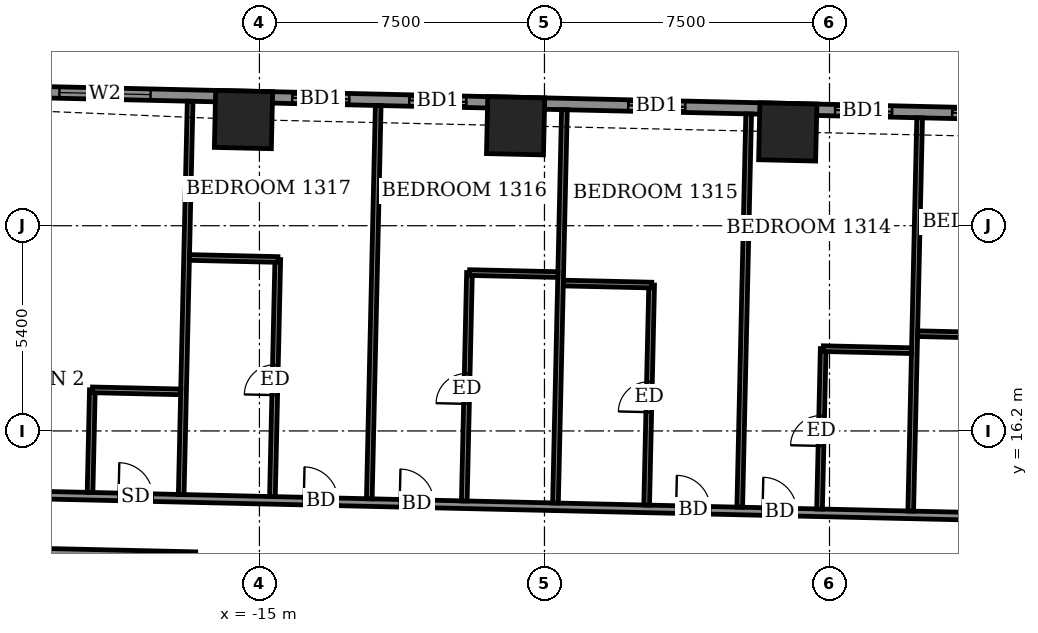
"""IFC4 building model, lengths in metres.
Left out: names, types, materials, properties, quantities, classifications, styles, units other than length and angle.
Written with IfcOpenShell. Run it as: python <this file> out.ifc"""

import sys

from ifc_helpers import new_model, si_unit, direction, frame, frame_2d, origin, origin_2d, place, context, subcontext, project, spatial, rectangle, extrude, element, fill, save


model = new_model("IFC4")
c1 = context("Model", 3, precision=1e-05, world=origin(), true_north=direction((0.0, 1.0)))
c2 = subcontext(c1, "Body", "Model", "MODEL_VIEW")
j1 = project(units=[si_unit("LENGTHUNIT", "METRE"), si_unit("PLANEANGLEUNIT", "RADIAN")], contexts=[c1])
p1 = place(None, origin())
s1 = spatial("IfcSite", under=j1, at=p1, CompositionType="ELEMENT")
p2 = place(p1, origin())
s2 = spatial("IfcBuilding", under=s1, at=p2, CompositionType="ELEMENT")
p3 = place(p2, frame((0.0, 0.0, 56.7)))
s3 = spatial("IfcBuildingStorey", under=s2, at=p3, CompositionType="ELEMENT", Elevation=56.7)
for number, where, z_axis, x_axis in (
    (1, (-1.098, 24.068, -0.55), (0.0, 0.0, 1.0), (-1.0, 0.023, 0.0)),
    (2, (-8.259, 24.23, -0.55), (0.0, 0.0, 1.0), (-1.0, 0.023, 0.0)),
    (3, (-15.419, 24.393, -0.55), (0.0, 0.0, 1.0), (-1.0, 0.023, 0.0)),
):
    element("IfcColumn", number, at=place(p3, frame(where, z_axis=z_axis, x_axis=x_axis)), inside=s3, PredefinedType="COLUMN", context=c2, shape_type="SweptSolid", body=[
        extrude(rectangle(XDim=1.5, YDim=1.5, at=origin_2d()), origin(), (0.0, 0.0, 1.0), 3.6),
    ])
p4 = place(p3, frame((27.407, 24.021, 0.0), z_axis=(0.0, 0.0, 1.0), x_axis=(-0.99974239923, 0.022696589664, 0.0)))
e4 = element("IfcWall", 4, at=p4, inside=s3, PredefinedType="SOLIDWALL", context=c2, shape_type="SweptSolid", body=[
    extrude(rectangle(XDim=49.836, YDim=0.3, at=frame_2d((24.918, 0.0))), origin(), (0.0, 0.0, 1.0), 3.05),
])
p5 = place(p4, frame((2.871, 0.0, 0.0)))
e5 = element("IfcOpeningElement", 5, at=p5, cuts=e4, PredefinedType="OPENING", context=c2, shape_type="SweptSolid", body=[
    extrude(rectangle(XDim=1.5, YDim=2.4, at=frame_2d((0.75, 1.2))), frame((0.0, 0.16, 0.0), z_axis=(0.0, -1.0, 0.0), x_axis=(1.0, 0.0, 0.0)), (0.0, 0.0, 1.0), 0.32),
])
p6 = place(p4, frame((8.349, 0.0, 0.0)))
e6 = element("IfcOpeningElement", 6, at=p6, cuts=e4, PredefinedType="OPENING", context=c2, shape_type="SweptSolid", body=[
    extrude(rectangle(XDim=1.5, YDim=2.4, at=frame_2d((0.75, 1.2))), frame((0.0, 0.16, 0.0), z_axis=(0.0, -1.0, 0.0), x_axis=(1.0, 0.0, 0.0)), (0.0, 0.0, 1.0), 0.32),
])
p7 = place(p4, frame((11.43, 0.0, 0.0)))
e7 = element("IfcOpeningElement", 7, at=p7, cuts=e4, PredefinedType="OPENING", context=c2, shape_type="SweptSolid", body=[
    extrude(rectangle(XDim=1.5, YDim=2.4, at=frame_2d((0.75, 1.2))), frame((0.0, 0.16, 0.0), z_axis=(0.0, -1.0, 0.0), x_axis=(1.0, 0.0, 0.0)), (0.0, 0.0, 1.0), 0.32),
])
p8 = place(p4, frame((17.236, 0.0, 0.0)))
e8 = element("IfcOpeningElement", 8, at=p8, cuts=e4, PredefinedType="OPENING", context=c2, shape_type="SweptSolid", body=[
    extrude(rectangle(XDim=1.5, YDim=2.4, at=frame_2d((0.75, 1.2))), frame((0.0, 0.16, 0.0), z_axis=(0.0, -1.0, 0.0), x_axis=(1.0, 0.0, 0.0)), (0.0, 0.0, 1.0), 0.32),
])
p9 = place(p4, frame((22.686, 0.0, 0.0)))
e9 = element("IfcOpeningElement", 9, at=p9, cuts=e4, PredefinedType="OPENING", context=c2, shape_type="SweptSolid", body=[
    extrude(rectangle(XDim=1.5, YDim=2.4, at=frame_2d((0.75, 1.2))), frame((0.0, 0.16, 0.0), z_axis=(0.0, -1.0, 0.0), x_axis=(1.0, 0.0, 0.0)), (0.0, 0.0, 1.0), 0.32),
])
p10 = place(p4, frame((25.767, 0.0, 0.0)))
e10 = element("IfcOpeningElement", 10, at=p10, cuts=e4, PredefinedType="OPENING", context=c2, shape_type="SweptSolid", body=[
    extrude(rectangle(XDim=1.5, YDim=2.4, at=frame_2d((0.75, 1.2))), frame((0.0, 0.16, 0.0), z_axis=(0.0, -1.0, 0.0), x_axis=(1.0, 0.0, 0.0)), (0.0, 0.0, 1.0), 0.32),
])
p11 = place(p4, frame((31.211, 0.0, 0.0)))
e11 = element("IfcOpeningElement", 11, at=p11, cuts=e4, PredefinedType="OPENING", context=c2, shape_type="SweptSolid", body=[
    extrude(rectangle(XDim=1.5, YDim=2.4, at=frame_2d((0.75, 1.2))), frame((0.0, 0.16, 0.0), z_axis=(0.0, -1.0, 0.0), x_axis=(1.0, 0.0, 0.0)), (0.0, 0.0, 1.0), 0.32),
])
p12 = place(p4, frame((36.974, 0.0, 0.0)))
e12 = element("IfcOpeningElement", 12, at=p12, cuts=e4, PredefinedType="OPENING", context=c2, shape_type="SweptSolid", body=[
    extrude(rectangle(XDim=1.5, YDim=2.4, at=frame_2d((0.75, 1.2))), frame((0.0, 0.16, 0.0), z_axis=(0.0, -1.0, 0.0), x_axis=(1.0, 0.0, 0.0)), (0.0, 0.0, 1.0), 0.32),
])
p13 = place(p4, frame((40.055, 0.0, 0.0)))
e13 = element("IfcOpeningElement", 13, at=p13, cuts=e4, PredefinedType="OPENING", context=c2, shape_type="SweptSolid", body=[
    extrude(rectangle(XDim=1.5, YDim=2.4, at=frame_2d((0.75, 1.2))), frame((0.0, 0.16, 0.0), z_axis=(0.0, -1.0, 0.0), x_axis=(1.0, 0.0, 0.0)), (0.0, 0.0, 1.0), 0.32),
])
p14 = place(p4, frame((45.282, 0.0, 0.9)))
e14 = element("IfcOpeningElement", 14, at=p14, cuts=e4, PredefinedType="OPENING", context=c2, shape_type="SweptSolid", body=[
    extrude(rectangle(XDim=2.4, YDim=1.5, at=frame_2d((1.2, 0.75))), frame((0.0, 0.16, 0.0), z_axis=(0.0, -1.0, 0.0), x_axis=(1.0, 0.0, 0.0)), (0.0, 0.0, 1.0), 0.32),
])
p15 = place(p3, frame((-25.49, 13.118, 0.0), z_axis=(0.0, 0.0, 1.0), x_axis=(0.999742607231, -0.02268742575, 0.0)))
e15 = element("IfcWall", 15, at=p15, inside=s3, PredefinedType="PARTITIONING", context=c2, shape_type="SweptSolid", body=[
    extrude(rectangle(XDim=8.813, YDim=0.2, at=frame_2d((4.407, 0.0))), origin(), (0.0, 0.0, 1.0), 3.05),
])
p16 = place(p15, frame((2.832, 0.0, 0.0)))
e16 = element("IfcOpeningElement", 16, at=p16, cuts=e15, PredefinedType="OPENING", context=c2, shape_type="SweptSolid", body=[
    extrude(rectangle(XDim=1.0, YDim=2.1, at=frame_2d((0.5, 1.05))), frame((0.0, 0.11, 0.0), z_axis=(0.0, -1.0, 0.0), x_axis=(1.0, 0.0, 0.0)), (0.0, 0.0, 1.0), 0.22),
])
p17 = place(p3, frame((-25.456, 14.618, 0.0), z_axis=(0.0, 0.0, 1.0), x_axis=(0.999742687583, -0.0226838847, 0.0)))
e17 = element("IfcWall", 17, at=p17, inside=s3, PredefinedType="PARTITIONING", context=c2, shape_type="SweptSolid", body=[
    extrude(rectangle(XDim=54.836, YDim=0.2, at=frame_2d((27.418, 0.0))), origin(), (0.0, 0.0, 1.0), 3.05),
])
p18 = place(p17, frame((52.493, 0.0, 0.0)))
e18 = element("IfcOpeningElement", 18, at=p18, cuts=e17, PredefinedType="OPENING", context=c2, shape_type="SweptSolid", body=[
    extrude(rectangle(XDim=1.0, YDim=2.1, at=frame_2d((0.5, 1.05))), frame((0.0, 0.11, 0.0), z_axis=(0.0, -1.0, 0.0), x_axis=(1.0, 0.0, 0.0)), (0.0, 0.0, 1.0), 0.22),
])
p19 = place(p17, frame((47.25, 0.0, 0.0)))
e19 = element("IfcOpeningElement", 19, at=p19, cuts=e17, PredefinedType="OPENING", context=c2, shape_type="SweptSolid", body=[
    extrude(rectangle(XDim=0.9, YDim=2.1, at=frame_2d((0.45, 1.05))), frame((0.0, 0.11, 0.0), z_axis=(0.0, -1.0, 0.0), x_axis=(1.0, 0.0, 0.0)), (0.0, 0.0, 1.0), 0.22),
])
p20 = place(p17, frame((42.525, 0.0, 0.0)))
e20 = element("IfcOpeningElement", 20, at=p20, cuts=e17, PredefinedType="OPENING", context=c2, shape_type="SweptSolid", body=[
    extrude(rectangle(XDim=0.9, YDim=2.1, at=frame_2d((0.45, 1.05))), frame((0.0, 0.11, 0.0), z_axis=(0.0, -1.0, 0.0), x_axis=(1.0, 0.0, 0.0)), (0.0, 0.0, 1.0), 0.22),
])
p21 = place(p17, frame((40.275, 0.0, 0.0)))
e21 = element("IfcOpeningElement", 21, at=p21, cuts=e17, PredefinedType="OPENING", context=c2, shape_type="SweptSolid", body=[
    extrude(rectangle(XDim=0.9, YDim=2.1, at=frame_2d((0.45, 1.05))), frame((0.0, 0.11, 0.0), z_axis=(0.0, -1.0, 0.0), x_axis=(1.0, 0.0, 0.0)), (0.0, 0.0, 1.0), 0.22),
])
p22 = place(p17, frame((33.0, 0.0, 0.0)))
e22 = element("IfcOpeningElement", 22, at=p22, cuts=e17, PredefinedType="OPENING", context=c2, shape_type="SweptSolid", body=[
    extrude(rectangle(XDim=0.9, YDim=2.1, at=frame_2d((0.45, 1.05))), frame((0.0, 0.11, 0.0), z_axis=(0.0, -1.0, 0.0), x_axis=(1.0, 0.0, 0.0)), (0.0, 0.0, 1.0), 0.22),
])
p23 = place(p17, frame((30.65, 0.0, 0.0)))
e23 = element("IfcOpeningElement", 23, at=p23, cuts=e17, PredefinedType="OPENING", context=c2, shape_type="SweptSolid", body=[
    extrude(rectangle(XDim=0.9, YDim=2.1, at=frame_2d((0.45, 1.05))), frame((0.0, 0.11, 0.0), z_axis=(0.0, -1.0, 0.0), x_axis=(1.0, 0.0, 0.0)), (0.0, 0.0, 1.0), 0.22),
])
p24 = place(p17, frame((23.7, 0.0, 0.0)))
e24 = element("IfcOpeningElement", 24, at=p24, cuts=e17, PredefinedType="OPENING", context=c2, shape_type="SweptSolid", body=[
    extrude(rectangle(XDim=0.9, YDim=2.1, at=frame_2d((0.45, 1.05))), frame((0.0, 0.11, 0.0), z_axis=(0.0, -1.0, 0.0), x_axis=(1.0, 0.0, 0.0)), (0.0, 0.0, 1.0), 0.22),
])
p25 = place(p17, frame((21.425, 0.0, 0.0)))
e25 = element("IfcOpeningElement", 25, at=p25, cuts=e17, PredefinedType="OPENING", context=c2, shape_type="SweptSolid", body=[
    extrude(rectangle(XDim=0.9, YDim=2.1, at=frame_2d((0.45, 1.05))), frame((0.0, 0.11, 0.0), z_axis=(0.0, -1.0, 0.0), x_axis=(1.0, 0.0, 0.0)), (0.0, 0.0, 1.0), 0.22),
])
p26 = place(p17, frame((14.15, 0.0, 0.0)))
e26 = element("IfcOpeningElement", 26, at=p26, cuts=e17, PredefinedType="OPENING", context=c2, shape_type="SweptSolid", body=[
    extrude(rectangle(XDim=0.9, YDim=2.1, at=frame_2d((0.45, 1.05))), frame((0.0, 0.11, 0.0), z_axis=(0.0, -1.0, 0.0), x_axis=(1.0, 0.0, 0.0)), (0.0, 0.0, 1.0), 0.22),
])
p27 = place(p17, frame((11.625, 0.0, 0.0)))
e27 = element("IfcOpeningElement", 27, at=p27, cuts=e17, PredefinedType="OPENING", context=c2, shape_type="SweptSolid", body=[
    extrude(rectangle(XDim=0.9, YDim=2.1, at=frame_2d((0.45, 1.05))), frame((0.0, 0.11, 0.0), z_axis=(0.0, -1.0, 0.0), x_axis=(1.0, 0.0, 0.0)), (0.0, 0.0, 1.0), 0.22),
])
p28 = place(p17, frame((1.425, 0.0, 0.0)))
e28 = element("IfcOpeningElement", 28, at=p28, cuts=e17, PredefinedType="OPENING", context=c2, shape_type="SweptSolid", body=[
    extrude(rectangle(XDim=1.0, YDim=2.1, at=frame_2d((0.5, 1.05))), frame((0.0, 0.11, 0.0), z_axis=(0.0, -1.0, 0.0), x_axis=(1.0, 0.0, 0.0)), (0.0, 0.0, 1.0), 0.22),
])
p29 = place(p17, frame((6.75, 0.0, 0.0)))
e29 = element("IfcOpeningElement", 29, at=p29, cuts=e17, PredefinedType="OPENING", context=c2, shape_type="SweptSolid", body=[
    extrude(rectangle(XDim=0.9, YDim=2.1, at=frame_2d((0.45, 1.05))), frame((0.0, 0.11, 0.0), z_axis=(0.0, -1.0, 0.0), x_axis=(1.0, 0.0, 0.0)), (0.0, 0.0, 1.0), 0.22),
])
p30 = place(p3, frame((-19.457, 14.582, 0.0), z_axis=(0.0, 0.0, 1.0), x_axis=(0.02260842146, 0.999744396973, 0.0)))
e30 = element("IfcWall", 30, at=p30, inside=s3, PredefinedType="PARTITIONING", context=c2, shape_type="SweptSolid", body=[
    extrude(rectangle(XDim=2.7, YDim=0.15, at=frame_2d((1.35, 0.0))), origin(), (0.0, 0.0, 1.0), 3.05),
])
p31 = place(p3, frame((-17.058, 14.527, 0.0), z_axis=(0.0, 0.0, 1.0), x_axis=(0.022714440015, 0.999741993824, 0.0)))
e31 = element("IfcWall", 31, at=p31, inside=s3, PredefinedType="PARTITIONING", context=c2, shape_type="SweptSolid", body=[
    extrude(rectangle(XDim=10.351, YDim=0.15, at=frame_2d((5.175, 0.0))), origin(), (0.0, 0.0, 1.0), 2.55),
])
p32 = place(p3, frame((-14.658, 14.473, 0.0), z_axis=(0.0, 0.0, 1.0), x_axis=(0.022576530581, 0.999745117651, 0.0)))
e32 = element("IfcWall", 32, at=p32, inside=s3, PredefinedType="PARTITIONING", context=c2, shape_type="SweptSolid", body=[
    extrude(rectangle(XDim=6.24, YDim=0.15, at=frame_2d((3.12, 0.0))), origin(), (0.0, 0.0, 1.0), 3.05),
])
p33 = place(p32, frame((2.67, 0.0, 0.0)))
e33 = element("IfcOpeningElement", 33, at=p33, cuts=e32, PredefinedType="OPENING", context=c2, shape_type="SweptSolid", body=[
    extrude(rectangle(XDim=0.8, YDim=2.1, at=frame_2d((0.4, 1.05))), frame((0.0, 0.085, 0.0), z_axis=(0.0, -1.0, 0.0), x_axis=(1.0, 0.0, 0.0)), (0.0, 0.0, 1.0), 0.17),
])
p34 = place(p3, frame((-12.109, 14.415, 0.0), z_axis=(0.0, 0.0, 1.0), x_axis=(0.022690865001, 0.999742529177, 0.0)))
e34 = element("IfcWall", 34, at=p34, inside=s3, PredefinedType="PARTITIONING", context=c2, shape_type="SweptSolid", body=[
    extrude(rectangle(XDim=10.351, YDim=0.15, at=frame_2d((5.175, 0.0))), origin(), (0.0, 0.0, 1.0), 2.55),
])
p35 = place(p3, frame((-9.61, 14.358, 0.0), z_axis=(0.0, 0.0, 1.0), x_axis=(0.022827512011, 0.999739418396, 0.0)))
e35 = element("IfcWall", 35, at=p35, inside=s3, PredefinedType="PARTITIONING", context=c2, shape_type="SweptSolid", body=[
    extrude(rectangle(XDim=6.01, YDim=0.15, at=frame_2d((3.005, 0.0))), origin(), (0.0, 0.0, 1.0), 3.05),
])
p36 = place(p35, frame((2.555, 0.0, 0.0)))
e36 = element("IfcOpeningElement", 36, at=p36, cuts=e35, PredefinedType="OPENING", context=c2, shape_type="SweptSolid", body=[
    extrude(rectangle(XDim=0.8, YDim=2.1, at=frame_2d((0.4, 1.05))), frame((0.0, 0.085, 0.0), z_axis=(0.0, -1.0, 0.0), x_axis=(1.0, 0.0, 0.0)), (0.0, 0.0, 1.0), 0.17),
])
p37 = place(p3, frame((-7.21, 14.304, 0.0), z_axis=(0.0, 0.0, 1.0), x_axis=(0.022693005506, 0.999742480592, 0.0)))
e37 = element("IfcWall", 37, at=p37, inside=s3, PredefinedType="PARTITIONING", context=c2, shape_type="SweptSolid", body=[
    extrude(rectangle(XDim=10.35, YDim=0.15, at=frame_2d((5.175, 0.0))), origin(), (0.0, 0.0, 1.0), 2.55),
])
p38 = place(p3, frame((-4.811, 14.25, 0.0), z_axis=(0.0, 0.0, 1.0), x_axis=(0.022644773889, 0.999743574231, 0.0)))
e38 = element("IfcWall", 38, at=p38, inside=s3, PredefinedType="PARTITIONING", context=c2, shape_type="SweptSolid", body=[
    extrude(rectangle(XDim=5.79, YDim=0.15, at=frame_2d((2.895, 0.0))), origin(), (0.0, 0.0, 1.0), 3.05),
])
p39 = place(p38, frame((2.445, 0.0, 0.0)))
e39 = element("IfcOpeningElement", 39, at=p39, cuts=e38, PredefinedType="OPENING", context=c2, shape_type="SweptSolid", body=[
    extrude(rectangle(XDim=0.8, YDim=2.1, at=frame_2d((0.4, 1.05))), frame((0.0, 0.085, 0.0), z_axis=(0.0, -1.0, 0.0), x_axis=(1.0, 0.0, 0.0)), (0.0, 0.0, 1.0), 0.17),
])
p40 = place(p3, frame((-2.362, 14.194, 0.0), z_axis=(0.0, 0.0, 1.0), x_axis=(0.022716582742, 0.999741945138, 0.0)))
e40 = element("IfcWall", 40, at=p40, inside=s3, PredefinedType="PARTITIONING", context=c2, shape_type="SweptSolid", body=[
    extrude(rectangle(XDim=10.35, YDim=0.15, at=frame_2d((5.175, 0.0))), origin(), (0.0, 0.0, 1.0), 2.55),
])
p41 = place(p3, frame((-0.262, 14.146, 0.0), z_axis=(0.0, 0.0, 1.0), x_axis=(0.0227358609, 0.999741506905, 0.0)))
e41 = element("IfcWall", 41, at=p41, inside=s3, PredefinedType="PARTITIONING", context=c2, shape_type="SweptSolid", body=[
    extrude(rectangle(XDim=4.22, YDim=0.15, at=frame_2d((2.11, 0.0))), origin(), (0.0, 0.0, 1.0), 3.05),
])
p42 = place(p41, frame((1.66, 0.0, 0.0)))
e42 = element("IfcOpeningElement", 42, at=p42, cuts=e41, PredefinedType="OPENING", context=c2, shape_type="SweptSolid", body=[
    extrude(rectangle(XDim=0.8, YDim=2.1, at=frame_2d((0.4, 1.05))), frame((0.0, 0.085, 0.0), z_axis=(0.0, -1.0, 0.0), x_axis=(1.0, 0.0, 0.0)), (0.0, 0.0, 1.0), 0.17),
])
p43 = place(p3, frame((2.137, 14.092, 0.0), z_axis=(0.0, 0.0, 1.0), x_axis=(0.022716582742, 0.999741945138, 0.0)))
e43 = element("IfcWall", 43, at=p43, inside=s3, PredefinedType="PARTITIONING", context=c2, shape_type="SweptSolid", body=[
    extrude(rectangle(XDim=10.35, YDim=0.15, at=frame_2d((5.175, 0.0))), origin(), (0.0, 0.0, 1.0), 2.55),
])
for number, where, z_axis, x_axis in (
    (44, (-19.394, 17.281, 0.0), (0.0, 0.0, 1.0), (1.0, -0.023, 0.0)),
    (45, (-0.164, 18.365, 0.0), (0.0, 0.0, 1.0), (1.0, -0.023, 0.0)),
):
    element("IfcWall", number, at=place(p3, frame(where, z_axis=z_axis, x_axis=x_axis)), inside=s3, PredefinedType="PARTITIONING", context=c2, shape_type="SweptSolid", body=[
        extrude(rectangle(XDim=2.324, YDim=0.15, at=frame_2d((1.162, 0.0))), origin(), (0.0, 0.0, 1.0), 3.05),
    ])
p44 = place(p3, frame((2.32, 18.759, 0.0), z_axis=(0.0, 0.0, 1.0), x_axis=(0.999740478815, -0.022781023197, 0.0)))
e46 = element("IfcWall", 46, at=p44, inside=s3, PredefinedType="PARTITIONING", context=c2, shape_type="SweptSolid", body=[
    extrude(rectangle(XDim=2.325, YDim=0.15, at=frame_2d((1.163, 0.0))), origin(), (0.0, 0.0, 1.0), 3.05),
])
for number, where, z_axis, x_axis in (
    (47, (-7.002, 20.091, 0.0), (0.0, 0.0, 1.0), (1.0, -0.023, 0.0)),
    (48, (-9.471, 20.367, 0.0), (0.0, 0.0, 1.0), (1.0, -0.023, 0.0)),
):
    element("IfcWall", number, at=place(p3, frame(where, z_axis=z_axis, x_axis=x_axis)), inside=s3, PredefinedType="PARTITIONING", context=c2, shape_type="SweptSolid", body=[
        extrude(rectangle(XDim=2.324, YDim=0.15, at=frame_2d((1.162, 0.0))), origin(), (0.0, 0.0, 1.0), 3.05),
    ])
p45 = place(p3, frame((-16.839, 20.764, 0.0), z_axis=(0.0, 0.0, 1.0), x_axis=(0.99974031529, -0.022788198363, 0.0)))
e49 = element("IfcWall", 49, at=p45, inside=s3, PredefinedType="PARTITIONING", context=c2, shape_type="SweptSolid", body=[
    extrude(rectangle(XDim=2.325, YDim=0.15, at=frame_2d((1.162, 0.0))), origin(), (0.0, 0.0, 1.0), 3.05),
])
p46 = place(p9, origin())
e50 = element("IfcDoor", 50, at=p46, inside=s3, OperationType="SLIDING_TO_LEFT", PredefinedType="DOOR", context=c2, shape_type="SweptSolid", body=[
    extrude(rectangle(XDim=1.5, YDim=2.4, at=frame_2d((0.75, 1.2))), frame((0.0, 0.025, 0.0), z_axis=(0.0, -1.0, 0.0), x_axis=(1.0, 0.0, 0.0)), (0.0, 0.0, 1.0), 0.05),
])
fill(e9, e50)
p47 = place(p10, origin())
e51 = element("IfcDoor", 51, at=p47, inside=s3, OperationType="SLIDING_TO_LEFT", PredefinedType="DOOR", context=c2, shape_type="SweptSolid", body=[
    extrude(rectangle(XDim=1.5, YDim=2.4, at=frame_2d((0.75, 1.2))), frame((0.0, 0.025, 0.0), z_axis=(0.0, -1.0, 0.0), x_axis=(1.0, 0.0, 0.0)), (0.0, 0.0, 1.0), 0.05),
])
fill(e10, e51)
p48 = place(p11, origin())
e52 = element("IfcDoor", 52, at=p48, inside=s3, OperationType="SLIDING_TO_LEFT", PredefinedType="DOOR", context=c2, shape_type="SweptSolid", body=[
    extrude(rectangle(XDim=1.5, YDim=2.4, at=frame_2d((0.75, 1.2))), frame((0.0, 0.025, 0.0), z_axis=(0.0, -1.0, 0.0), x_axis=(1.0, 0.0, 0.0)), (0.0, 0.0, 1.0), 0.05),
])
fill(e11, e52)
p49 = place(p12, origin())
e53 = element("IfcDoor", 53, at=p49, inside=s3, OperationType="SLIDING_TO_LEFT", PredefinedType="DOOR", context=c2, shape_type="SweptSolid", body=[
    extrude(rectangle(XDim=1.5, YDim=2.4, at=frame_2d((0.75, 1.2))), frame((0.0, 0.025, 0.0), z_axis=(0.0, -1.0, 0.0), x_axis=(1.0, 0.0, 0.0)), (0.0, 0.0, 1.0), 0.05),
])
fill(e12, e53)
p50 = place(p13, origin())
e54 = element("IfcDoor", 54, at=p50, inside=s3, OperationType="SLIDING_TO_LEFT", PredefinedType="DOOR", context=c2, shape_type="SweptSolid", body=[
    extrude(rectangle(XDim=1.5, YDim=2.4, at=frame_2d((0.75, 1.2))), frame((0.0, 0.025, 0.0), z_axis=(0.0, -1.0, 0.0), x_axis=(1.0, 0.0, 0.0)), (0.0, 0.0, 1.0), 0.05),
])
fill(e13, e54)
p51 = place(p14, origin())
e55 = element("IfcWindow", 55, at=p51, inside=s3, PartitioningType="DOUBLE_PANEL_VERTICAL", PredefinedType="WINDOW", context=c2, shape_type="SweptSolid", body=[
    extrude(rectangle(XDim=2.4, YDim=1.5, at=frame_2d((1.2, 0.75))), frame((0.0, 0.03, 0.0), z_axis=(0.0, -1.0, 0.0), x_axis=(1.0, 0.0, 0.0)), (0.0, 0.0, 1.0), 0.06),
])
fill(e14, e55)
p52 = place(p24, origin())
e56 = element("IfcDoor", 56, at=p52, inside=s3, OperationType="SINGLE_SWING_RIGHT", PredefinedType="DOOR", context=c2, shape_type="SweptSolid", body=[
    extrude(rectangle(XDim=0.9, YDim=2.1, at=frame_2d((0.45, 1.05))), frame((0.0, 0.025, 0.0), z_axis=(0.0, -1.0, 0.0), x_axis=(1.0, 0.0, 0.0)), (0.0, 0.0, 1.0), 0.05),
])
fill(e24, e56)
p53 = place(p42, origin())
e57 = element("IfcDoor", 57, at=p53, inside=s3, OperationType="SINGLE_SWING_RIGHT", PredefinedType="DOOR", context=c2, shape_type="SweptSolid", body=[
    extrude(rectangle(XDim=0.8, YDim=2.1, at=frame_2d((0.4, 1.05))), frame((0.0, 0.025, 0.0), z_axis=(0.0, -1.0, 0.0), x_axis=(1.0, 0.0, 0.0)), (0.0, 0.0, 1.0), 0.05),
])
fill(e42, e57)
p54 = place(p25, origin())
e58 = element("IfcDoor", 58, at=p54, inside=s3, OperationType="SINGLE_SWING_LEFT", PredefinedType="DOOR", context=c2, shape_type="SweptSolid", body=[
    extrude(rectangle(XDim=0.9, YDim=2.1, at=frame_2d((0.45, 1.05))), frame((0.0, 0.025, 0.0), z_axis=(0.0, -1.0, 0.0), x_axis=(1.0, 0.0, 0.0)), (0.0, 0.0, 1.0), 0.05),
])
fill(e25, e58)
p55 = place(p39, origin())
e59 = element("IfcDoor", 59, at=p55, inside=s3, OperationType="SINGLE_SWING_LEFT", PredefinedType="DOOR", context=c2, shape_type="SweptSolid", body=[
    extrude(rectangle(XDim=0.8, YDim=2.1, at=frame_2d((0.4, 1.05))), frame((0.0, 0.025, 0.0), z_axis=(0.0, -1.0, 0.0), x_axis=(1.0, 0.0, 0.0)), (0.0, 0.0, 1.0), 0.05),
])
fill(e39, e59)
p56 = place(p26, origin())
e60 = element("IfcDoor", 60, at=p56, inside=s3, OperationType="SINGLE_SWING_RIGHT", PredefinedType="DOOR", context=c2, shape_type="SweptSolid", body=[
    extrude(rectangle(XDim=0.9, YDim=2.1, at=frame_2d((0.45, 1.05))), frame((0.0, 0.025, 0.0), z_axis=(0.0, -1.0, 0.0), x_axis=(1.0, 0.0, 0.0)), (0.0, 0.0, 1.0), 0.05),
])
fill(e26, e60)
p57 = place(p36, origin())
e61 = element("IfcDoor", 61, at=p57, inside=s3, OperationType="SINGLE_SWING_RIGHT", PredefinedType="DOOR", context=c2, shape_type="SweptSolid", body=[
    extrude(rectangle(XDim=0.8, YDim=2.1, at=frame_2d((0.4, 1.05))), frame((0.0, 0.025, 0.0), z_axis=(0.0, -1.0, 0.0), x_axis=(1.0, 0.0, 0.0)), (0.0, 0.0, 1.0), 0.05),
])
fill(e36, e61)
p58 = place(p27, origin())
e62 = element("IfcDoor", 62, at=p58, inside=s3, OperationType="SINGLE_SWING_LEFT", PredefinedType="DOOR", context=c2, shape_type="SweptSolid", body=[
    extrude(rectangle(XDim=0.9, YDim=2.1, at=frame_2d((0.45, 1.05))), frame((0.0, 0.025, 0.0), z_axis=(0.0, -1.0, 0.0), x_axis=(1.0, 0.0, 0.0)), (0.0, 0.0, 1.0), 0.05),
])
fill(e27, e62)
p59 = place(p33, origin())
e63 = element("IfcDoor", 63, at=p59, inside=s3, OperationType="SINGLE_SWING_LEFT", PredefinedType="DOOR", context=c2, shape_type="SweptSolid", body=[
    extrude(rectangle(XDim=0.8, YDim=2.1, at=frame_2d((0.4, 1.05))), frame((0.0, 0.025, 0.0), z_axis=(0.0, -1.0, 0.0), x_axis=(1.0, 0.0, 0.0)), (0.0, 0.0, 1.0), 0.05),
])
fill(e33, e63)
p60 = place(p29, origin())
e64 = element("IfcDoor", 64, at=p60, inside=s3, OperationType="SINGLE_SWING_RIGHT", PredefinedType="DOOR", context=c2, shape_type="SweptSolid", body=[
    extrude(rectangle(XDim=0.9, YDim=2.1, at=frame_2d((0.45, 1.05))), frame((0.0, 0.025, 0.0), z_axis=(0.0, -1.0, 0.0), x_axis=(1.0, 0.0, 0.0)), (0.0, 0.0, 1.0), 0.05),
])
fill(e29, e64)
save(model, sys.argv[1])
